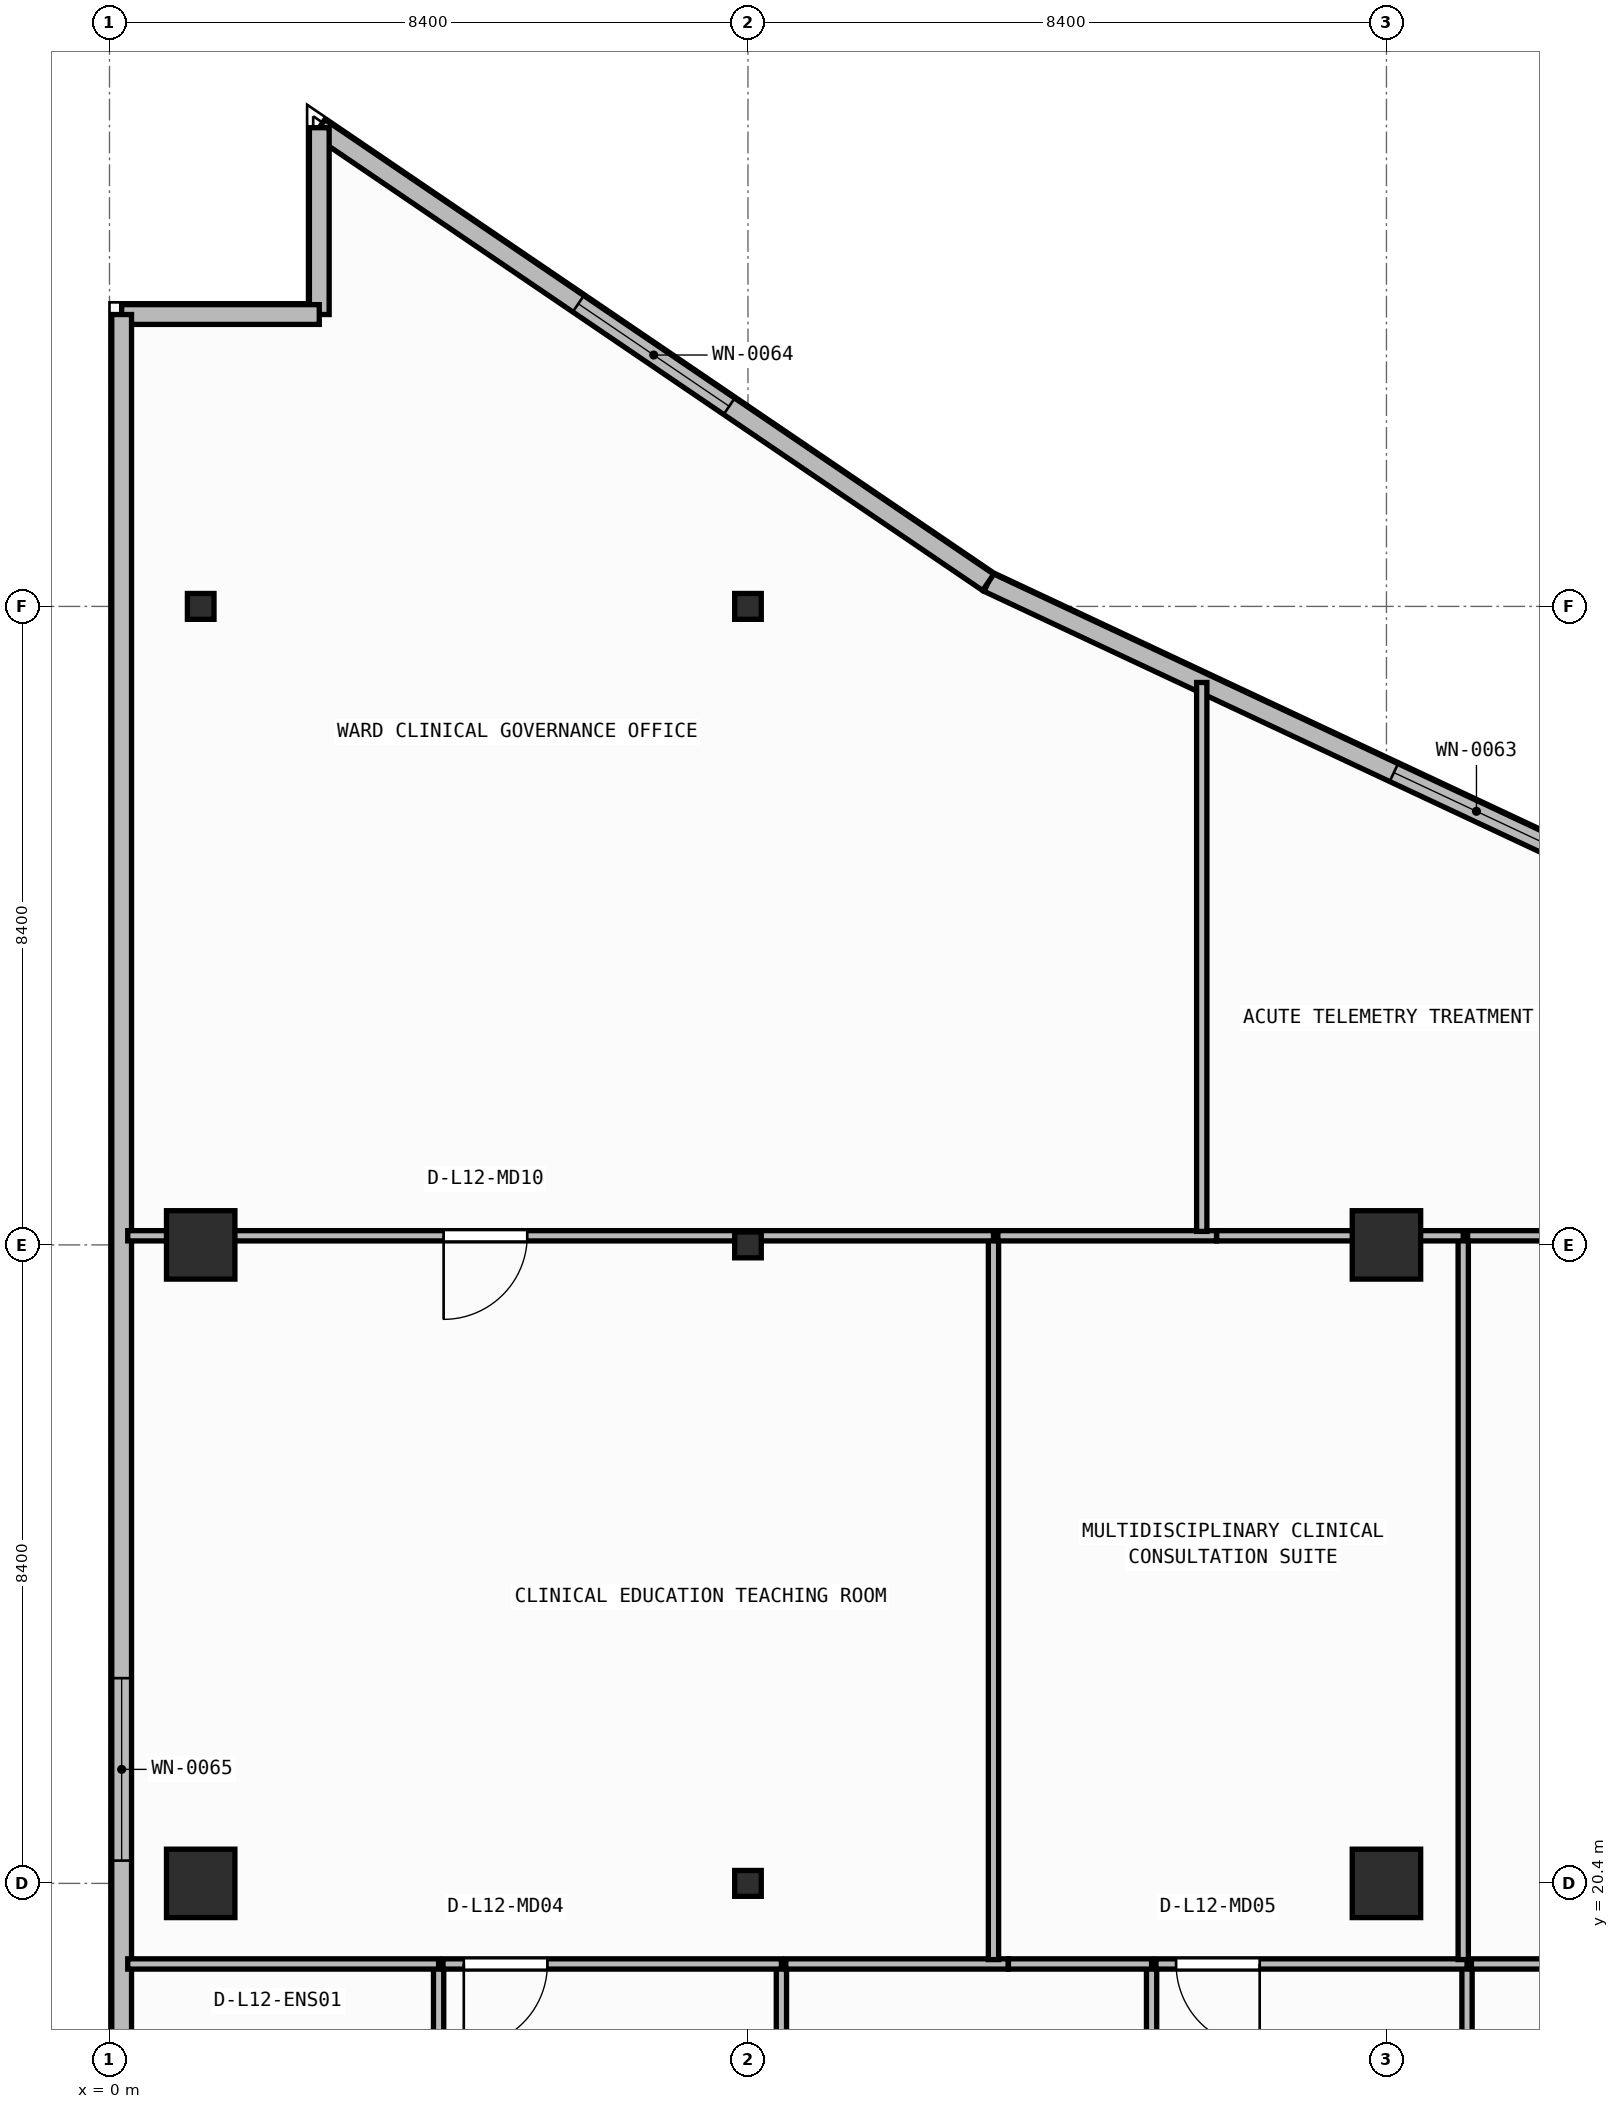
"""IFC4 building model, lengths in metres.
Left out: names, types, materials, properties, quantities, classifications, styles, units other than length and angle.
Written with IfcOpenShell. Run it as: python <this file> out.ifc"""

import sys

from ifc_helpers import new_model, si_unit, direction, frame, frame_2d, origin, origin_2d, place, context, subcontext, project, spatial, rectangle, i_section, extrude, element, fill, save


model = new_model("IFC4")
c1 = context("Model", 3, precision=1e-05, world=origin(), true_north=direction((0.0, 1.0)))
c2 = subcontext(c1, "Body", "Model", "MODEL_VIEW")
j1 = project(units=[si_unit("LENGTHUNIT", "METRE"), si_unit("PLANEANGLEUNIT", "RADIAN")], contexts=[c1])
p1 = place(None, origin())
s1 = spatial("IfcSite", under=j1, at=p1, CompositionType="ELEMENT")
p2 = place(p1, origin())
s2 = spatial("IfcBuilding", under=s1, at=p2, CompositionType="ELEMENT")
p3 = place(p2, frame((0.0, 0.0, 50.15)))
s3 = spatial("IfcBuildingStorey", under=s2, at=p3, CompositionType="ELEMENT", Elevation=50.15)
p4 = place(p3, frame((1.2, 20.4, 0.0), z_axis=(0.0, 0.0, 1.0), x_axis=(1.0, 0.0, 0.0)))
e1 = element("IfcColumn", 1, at=p4, inside=s3, PredefinedType="COLUMN", context=c2, shape_type="SweptSolid", body=[
    extrude(rectangle(XDim=0.9, YDim=0.9, at=origin_2d()), origin(), (0.0, 0.0, 1.0), 3.95),
])
p5 = place(p3, frame((8.4, 20.4, 0.0), z_axis=(0.0, 0.0, 1.0), x_axis=(1.0, 0.0, 0.0)))
e2 = element("IfcColumn", 2, at=p5, inside=s3, PredefinedType="COLUMN", context=c2, shape_type="SweptSolid", body=[
    extrude(i_section(OverallWidth=0.35, OverallDepth=0.34, WebThickness=0.016, FlangeThickness=0.028, at=origin_2d()), origin(), (0.0, 0.0, 1.0), 3.95),
])
for number, where, z_axis, x_axis in (
    (3, (16.8, 20.4, 0.0), (0.0, 0.0, 1.0), (1.0, 0.0, 0.0)),
    (4, (1.2, 28.8, 0.0), (0.0, 0.0, 1.0), (1.0, 0.0, 0.0)),
):
    element("IfcColumn", number, at=place(p3, frame(where, z_axis=z_axis, x_axis=x_axis)), inside=s3, PredefinedType="COLUMN", context=c2, shape_type="SweptSolid", body=[
        extrude(rectangle(XDim=0.9, YDim=0.9, at=origin_2d()), origin(), (0.0, 0.0, 1.0), 3.95),
    ])
p6 = place(p3, frame((8.4, 28.8, 0.0), z_axis=(0.0, 0.0, 1.0), x_axis=(1.0, 0.0, 0.0)))
e5 = element("IfcColumn", 5, at=p6, inside=s3, PredefinedType="COLUMN", context=c2, shape_type="SweptSolid", body=[
    extrude(i_section(OverallWidth=0.35, OverallDepth=0.34, WebThickness=0.016, FlangeThickness=0.028, at=origin_2d()), origin(), (0.0, 0.0, 1.0), 3.95),
])
p7 = place(p3, frame((16.8, 28.8, 0.0), z_axis=(0.0, 0.0, 1.0), x_axis=(1.0, 0.0, 0.0)))
e6 = element("IfcColumn", 6, at=p7, inside=s3, PredefinedType="COLUMN", context=c2, shape_type="SweptSolid", body=[
    extrude(rectangle(XDim=0.9, YDim=0.9, at=origin_2d()), origin(), (0.0, 0.0, 1.0), 3.95),
])
for number, where, z_axis, x_axis in (
    (7, (1.2, 37.2, 0.0), (0.0, 0.0, 1.0), (1.0, 0.0, 0.0)),
    (8, (8.4, 37.2, 0.0), (0.0, 0.0, 1.0), (1.0, 0.0, 0.0)),
):
    element("IfcColumn", number, at=place(p3, frame(where, z_axis=z_axis, x_axis=x_axis)), inside=s3, PredefinedType="COLUMN", context=c2, shape_type="SweptSolid", body=[
        extrude(i_section(OverallWidth=0.35, OverallDepth=0.34, WebThickness=0.016, FlangeThickness=0.028, at=origin_2d()), origin(), (0.0, 0.0, 1.0), 3.95),
    ])
p8 = place(p3, frame((24.408, 31.492, 0.0), z_axis=(0.0, 0.0, 1.0), x_axis=(-0.905396522918, 0.424566998585, 0.0)))
e9 = element("IfcWall", 9, at=p8, inside=s3, PredefinedType="STANDARD", context=c2, shape_type="SweptSolid", body=[
    extrude(rectangle(XDim=14.189, YDim=0.26, at=frame_2d((7.095, 0.0))), origin(), (0.0, 0.0, 1.0), 3.71),
])
p9 = place(p8, frame((5.895, 0.0, 0.9)))
e10 = element("IfcOpeningElement", 10, at=p9, cuts=e9, PredefinedType="OPENING", context=c2, shape_type="SweptSolid", body=[
    extrude(rectangle(XDim=2.4, YDim=1.65, at=frame_2d((1.2, 0.825))), frame((0.0, 0.14, 0.0), z_axis=(0.0, -1.0, 0.0), x_axis=(1.0, 0.0, 0.0)), (0.0, 0.0, 1.0), 0.28),
])
p10 = place(p3, frame((11.561, 37.517, 0.0), z_axis=(0.0, 0.0, 1.0), x_axis=(-0.827064743936, 0.562106670782, 0.0)))
e11 = element("IfcWall", 11, at=p10, inside=s3, PredefinedType="STANDARD", context=c2, shape_type="SweptSolid", body=[
    extrude(rectangle(XDim=10.641, YDim=0.26, at=frame_2d((5.32, 0.0))), origin(), (0.0, 0.0, 1.0), 3.71),
])
p11 = place(p10, frame((4.12, 0.0, 0.9)))
e12 = element("IfcOpeningElement", 12, at=p11, cuts=e11, PredefinedType="OPENING", context=c2, shape_type="SweptSolid", body=[
    extrude(rectangle(XDim=2.4, YDim=1.65, at=frame_2d((1.2, 0.825))), frame((0.0, 0.14, 0.0), z_axis=(0.0, -1.0, 0.0), x_axis=(1.0, 0.0, 0.0)), (0.0, 0.0, 1.0), 0.28),
])
p12 = place(p3, frame((2.76, 43.498, 0.0), z_axis=(0.0, 0.0, 1.0), x_axis=(0.0, -1.0, 0.0)))
e13 = element("IfcWall", 13, at=p12, inside=s3, PredefinedType="STANDARD", context=c2, shape_type="SweptSolid", body=[
    extrude(rectangle(XDim=2.458, YDim=0.26, at=frame_2d((1.229, 0.0))), origin(), (0.0, 0.0, 1.0), 3.71),
])
p13 = place(p3, frame((2.76, 41.04, 0.0), z_axis=(0.0, 0.0, 1.0), x_axis=(-1.0, 0.0, 0.0)))
e14 = element("IfcWall", 14, at=p13, inside=s3, PredefinedType="STANDARD", context=c2, shape_type="SweptSolid", body=[
    extrude(rectangle(XDim=2.6, YDim=0.26, at=frame_2d((1.3, 0.0))), origin(), (0.0, 0.0, 1.0), 3.71),
])
p14 = place(p3, frame((0.16, 41.04, 0.0), z_axis=(0.0, 0.0, 1.0), x_axis=(0.0, -1.0, 0.0)))
e15 = element("IfcWall", 15, at=p14, inside=s3, PredefinedType="STANDARD", context=c2, shape_type="SweptSolid", body=[
    extrude(rectangle(XDim=38.28, YDim=0.26, at=frame_2d((19.14, 0.0))), origin(), (0.0, 0.0, 1.0), 3.71),
])
p15 = place(p14, frame((17.94, 0.0, 0.9)))
e16 = element("IfcOpeningElement", 16, at=p15, cuts=e15, PredefinedType="OPENING", context=c2, shape_type="SweptSolid", body=[
    extrude(rectangle(XDim=2.4, YDim=1.65, at=frame_2d((1.2, 0.825))), frame((0.0, 0.14, 0.0), z_axis=(0.0, -1.0, 0.0), x_axis=(1.0, 0.0, 0.0)), (0.0, 0.0, 1.0), 0.28),
])
p16 = place(p14, frame((22.869, 0.0, 0.9)))
e17 = element("IfcOpeningElement", 17, at=p16, cuts=e15, PredefinedType="OPENING", context=c2, shape_type="SweptSolid", body=[
    extrude(rectangle(XDim=2.4, YDim=1.65, at=frame_2d((1.2, 0.825))), frame((0.0, 0.14, 0.0), z_axis=(0.0, -1.0, 0.0), x_axis=(1.0, 0.0, 0.0)), (0.0, 0.0, 1.0), 0.28),
])
p17 = place(p3, frame((4.33, 18.04, 0.0), z_axis=(0.0, 0.0, 1.0), x_axis=(0.0, 1.0, 0.0)))
e18 = element("IfcWall", 18, at=p17, inside=s3, PredefinedType="PARTITIONING", context=c2, shape_type="SweptSolid", body=[
    extrude(rectangle(XDim=1.3, YDim=0.135, at=frame_2d((0.65, 0.0))), origin(), (0.0, 0.0, 1.0), 3.71),
])
p18 = place(p3, frame((4.33, 19.34, 0.0), z_axis=(0.0, 0.0, 1.0), x_axis=(-1.0, 0.0, 0.0)))
e19 = element("IfcWall", 19, at=p18, inside=s3, PredefinedType="PARTITIONING", context=c2, shape_type="SweptSolid", body=[
    extrude(rectangle(XDim=4.09, YDim=0.135, at=frame_2d((2.045, 0.0))), origin(), (0.0, 0.0, 1.0), 3.71),
])
p19 = place(p3, frame((8.84, 17.833, 0.0), z_axis=(0.0, 0.0, 1.0), x_axis=(0.0, 1.0, 0.0)))
e20 = element("IfcWall", 20, at=p19, inside=s3, PredefinedType="PARTITIONING", context=c2, shape_type="SweptSolid", body=[
    extrude(rectangle(XDim=1.508, YDim=0.135, at=frame_2d((0.754, 0.0))), origin(), (0.0, 0.0, 1.0), 3.71),
])
p20 = place(p3, frame((8.84, 19.34, 0.0), z_axis=(0.0, 0.0, 1.0), x_axis=(-1.0, 0.0, 0.0)))
e21 = element("IfcWall", 21, at=p20, inside=s3, PredefinedType="PARTITIONING", context=c2, shape_type="SweptSolid", body=[
    extrude(rectangle(XDim=4.453, YDim=0.135, at=frame_2d((2.226, 0.0))), origin(), (0.0, 0.0, 1.0), 3.71),
])
p21 = place(p20, frame((3.079, 0.0, 0.0)))
e22 = element("IfcOpeningElement", 22, at=p21, cuts=e21, PredefinedType="OPENING", context=c2, shape_type="SweptSolid", body=[
    extrude(rectangle(XDim=1.1, YDim=2.1, at=frame_2d((0.55, 1.05))), frame((0.0, 0.077, 0.0), z_axis=(0.0, -1.0, 0.0), x_axis=(1.0, 0.0, 0.0)), (0.0, 0.0, 1.0), 0.155),
])
p22 = place(p3, frame((13.71, 14.76, 0.0), z_axis=(0.0, 0.0, 1.0), x_axis=(0.0, 1.0, 0.0)))
e23 = element("IfcWall", 23, at=p22, inside=s3, PredefinedType="PARTITIONING", context=c2, shape_type="SweptSolid", body=[
    extrude(rectangle(XDim=4.58, YDim=0.135, at=frame_2d((2.29, 0.0))), origin(), (0.0, 0.0, 1.0), 3.71),
])
p23 = place(p3, frame((11.825, 19.34, 0.0), z_axis=(0.0, 0.0, 1.0), x_axis=(-1.0, 0.0, 0.0)))
e24 = element("IfcWall", 24, at=p23, inside=s3, PredefinedType="PARTITIONING", context=c2, shape_type="SweptSolid", body=[
    extrude(rectangle(XDim=2.927, YDim=0.135, at=frame_2d((1.464, 0.0))), origin(), (0.0, 0.0, 1.0), 3.71),
])
p24 = place(p3, frame((13.71, 19.34, 0.0), z_axis=(0.0, 0.0, 1.0), x_axis=(-1.0, 0.0, 0.0)))
e25 = element("IfcWall", 25, at=p24, inside=s3, PredefinedType="PARTITIONING", context=c2, shape_type="SweptSolid", body=[
    extrude(rectangle(XDim=1.883, YDim=0.135, at=frame_2d((0.942, 0.0))), origin(), (0.0, 0.0, 1.0), 3.71),
])
p25 = place(p3, frame((17.86, 17.833, 0.0), z_axis=(0.0, 0.0, 1.0), x_axis=(0.0, 1.0, 0.0)))
e26 = element("IfcWall", 26, at=p25, inside=s3, PredefinedType="PARTITIONING", context=c2, shape_type="SweptSolid", body=[
    extrude(rectangle(XDim=1.508, YDim=0.135, at=frame_2d((0.754, 0.0))), origin(), (0.0, 0.0, 1.0), 3.71),
])
p26 = place(p3, frame((17.86, 19.34, 0.0), z_axis=(0.0, 0.0, 1.0), x_axis=(-1.0, 0.0, 0.0)))
e27 = element("IfcWall", 27, at=p26, inside=s3, PredefinedType="PARTITIONING", context=c2, shape_type="SweptSolid", body=[
    extrude(rectangle(XDim=4.093, YDim=0.135, at=frame_2d((2.046, 0.0))), origin(), (0.0, 0.0, 1.0), 3.71),
])
p27 = place(p26, frame((2.728, 0.0, 0.0)))
e28 = element("IfcOpeningElement", 28, at=p27, cuts=e27, PredefinedType="OPENING", context=c2, shape_type="SweptSolid", body=[
    extrude(rectangle(XDim=1.1, YDim=2.1, at=frame_2d((0.55, 1.05))), frame((0.0, 0.077, 0.0), z_axis=(0.0, -1.0, 0.0), x_axis=(1.0, 0.0, 0.0)), (0.0, 0.0, 1.0), 0.155),
])
p28 = place(p3, frame((22.37, 19.34, 0.0), z_axis=(0.0, 0.0, 1.0), x_axis=(-1.0, 0.0, 0.0)))
e29 = element("IfcWall", 29, at=p28, inside=s3, PredefinedType="PARTITIONING", context=c2, shape_type="SweptSolid", body=[
    extrude(rectangle(XDim=4.453, YDim=0.135, at=frame_2d((2.226, 0.0))), origin(), (0.0, 0.0, 1.0), 3.71),
])
p29 = place(p3, frame((11.63, 19.397, 0.0), z_axis=(0.0, 0.0, 1.0), x_axis=(0.0, 1.0, 0.0)))
e30 = element("IfcWall", 30, at=p29, inside=s3, PredefinedType="PARTITIONING", context=c2, shape_type="SweptSolid", body=[
    extrude(rectangle(XDim=9.522, YDim=0.135, at=frame_2d((4.761, 0.0))), origin(), (0.0, 0.0, 1.0), 3.71),
])
p30 = place(p3, frame((11.63, 28.92, 0.0), z_axis=(0.0, 0.0, 1.0), x_axis=(-1.0, 0.0, 0.0)))
e31 = element("IfcWall", 31, at=p30, inside=s3, PredefinedType="PARTITIONING", context=c2, shape_type="SweptSolid", body=[
    extrude(rectangle(XDim=11.39, YDim=0.135, at=frame_2d((5.695, 0.0))), origin(), (0.0, 0.0, 1.0), 3.073),
])
p31 = place(p30, frame((6.134, 0.0, 0.0)))
e32 = element("IfcOpeningElement", 32, at=p31, cuts=e31, PredefinedType="OPENING", context=c2, shape_type="SweptSolid", body=[
    extrude(rectangle(XDim=1.1, YDim=2.1, at=frame_2d((0.55, 1.05))), frame((0.0, 0.077, 0.0), z_axis=(0.0, -1.0, 0.0), x_axis=(1.0, 0.0, 0.0)), (0.0, 0.0, 1.0), 0.155),
])
p32 = place(p3, frame((17.81, 19.397, 0.0), z_axis=(0.0, 0.0, 1.0), x_axis=(0.0, 1.0, 0.0)))
e33 = element("IfcWall", 33, at=p32, inside=s3, PredefinedType="PARTITIONING", context=c2, shape_type="SweptSolid", body=[
    extrude(rectangle(XDim=9.522, YDim=0.135, at=frame_2d((4.761, 0.0))), origin(), (0.0, 0.0, 1.0), 3.71),
])
p33 = place(p3, frame((14.565, 28.92, 0.0), z_axis=(0.0, 0.0, 1.0), x_axis=(-1.0, 0.0, 0.0)))
e34 = element("IfcWall", 34, at=p33, inside=s3, PredefinedType="PARTITIONING", context=c2, shape_type="SweptSolid", body=[
    extrude(rectangle(XDim=2.877, YDim=0.135, at=frame_2d((1.438, 0.0))), origin(), (0.0, 0.0, 1.0), 3.073),
])
p34 = place(p3, frame((17.81, 28.92, 0.0), z_axis=(0.0, 0.0, 1.0), x_axis=(-1.0, 0.0, 0.0)))
e35 = element("IfcWall", 35, at=p34, inside=s3, PredefinedType="PARTITIONING", context=c2, shape_type="SweptSolid", body=[
    extrude(rectangle(XDim=3.243, YDim=0.135, at=frame_2d((1.622, 0.0))), origin(), (0.0, 0.0, 1.0), 3.073),
])
p35 = place(p3, frame((27.32, 28.92, 0.0), z_axis=(0.0, 0.0, 1.0), x_axis=(-1.0, 0.0, 0.0)))
e36 = element("IfcWall", 36, at=p35, inside=s3, PredefinedType="PARTITIONING", context=c2, shape_type="SweptSolid", body=[
    extrude(rectangle(XDim=9.453, YDim=0.135, at=frame_2d((4.726, 0.0))), origin(), (0.0, 0.0, 1.0), 3.073),
])
p36 = place(p3, frame((14.37, 28.978, 0.0), z_axis=(0.0, 0.0, 1.0), x_axis=(0.0, 1.0, 0.0)))
e37 = element("IfcWall", 37, at=p36, inside=s3, PredefinedType="PARTITIONING", context=c2, shape_type="SweptSolid", body=[
    extrude(rectangle(XDim=7.222, YDim=0.135, at=frame_2d((3.611, 0.0))), origin(), (0.0, 0.0, 1.0), 3.71),
])
p37 = place(p9, origin())
e38 = element("IfcWindow", 38, at=p37, inside=s3, PartitioningType="SINGLE_PANEL", PredefinedType="WINDOW", context=c2, shape_type="SweptSolid", body=[
    extrude(rectangle(XDim=2.4, YDim=1.65, at=frame_2d((1.2, 0.825))), frame((0.0, 0.03, 0.0), z_axis=(0.0, -1.0, 0.0), x_axis=(1.0, 0.0, 0.0)), (0.0, 0.0, 1.0), 0.06),
])
fill(e10, e38)
p38 = place(p11, origin())
e39 = element("IfcWindow", 39, at=p38, inside=s3, PartitioningType="SINGLE_PANEL", PredefinedType="WINDOW", context=c2, shape_type="SweptSolid", body=[
    extrude(rectangle(XDim=2.4, YDim=1.65, at=frame_2d((1.2, 0.825))), frame((0.0, 0.03, 0.0), z_axis=(0.0, -1.0, 0.0), x_axis=(1.0, 0.0, 0.0)), (0.0, 0.0, 1.0), 0.06),
])
fill(e12, e39)
p39 = place(p15, origin())
e40 = element("IfcWindow", 40, at=p39, inside=s3, PartitioningType="SINGLE_PANEL", PredefinedType="WINDOW", context=c2, shape_type="SweptSolid", body=[
    extrude(rectangle(XDim=2.4, YDim=1.65, at=frame_2d((1.2, 0.825))), frame((0.0, 0.03, 0.0), z_axis=(0.0, -1.0, 0.0), x_axis=(1.0, 0.0, 0.0)), (0.0, 0.0, 1.0), 0.06),
])
fill(e16, e40)
p40 = place(p21, origin())
e41 = element("IfcDoor", 41, at=p40, inside=s3, OperationType="SINGLE_SWING_RIGHT", PredefinedType="DOOR", context=c2, shape_type="SweptSolid", body=[
    extrude(rectangle(XDim=1.1, YDim=2.1, at=frame_2d((0.55, 1.05))), frame((0.0, 0.025, 0.0), z_axis=(0.0, -1.0, 0.0), x_axis=(1.0, 0.0, 0.0)), (0.0, 0.0, 1.0), 0.05),
])
fill(e22, e41)
p41 = place(p27, origin())
e42 = element("IfcDoor", 42, at=p41, inside=s3, OperationType="SINGLE_SWING_LEFT", PredefinedType="DOOR", context=c2, shape_type="SweptSolid", body=[
    extrude(rectangle(XDim=1.1, YDim=2.1, at=frame_2d((0.55, 1.05))), frame((0.0, 0.025, 0.0), z_axis=(0.0, -1.0, 0.0), x_axis=(1.0, 0.0, 0.0)), (0.0, 0.0, 1.0), 0.05),
])
fill(e28, e42)
p42 = place(p31, origin())
e43 = element("IfcDoor", 43, at=p42, inside=s3, OperationType="SINGLE_SWING_RIGHT", PredefinedType="DOOR", context=c2, shape_type="SweptSolid", body=[
    extrude(rectangle(XDim=1.1, YDim=2.1, at=frame_2d((0.55, 1.05))), frame((0.0, 0.025, 0.0), z_axis=(0.0, -1.0, 0.0), x_axis=(1.0, 0.0, 0.0)), (0.0, 0.0, 1.0), 0.05),
])
fill(e32, e43)
save(model, sys.argv[1])
